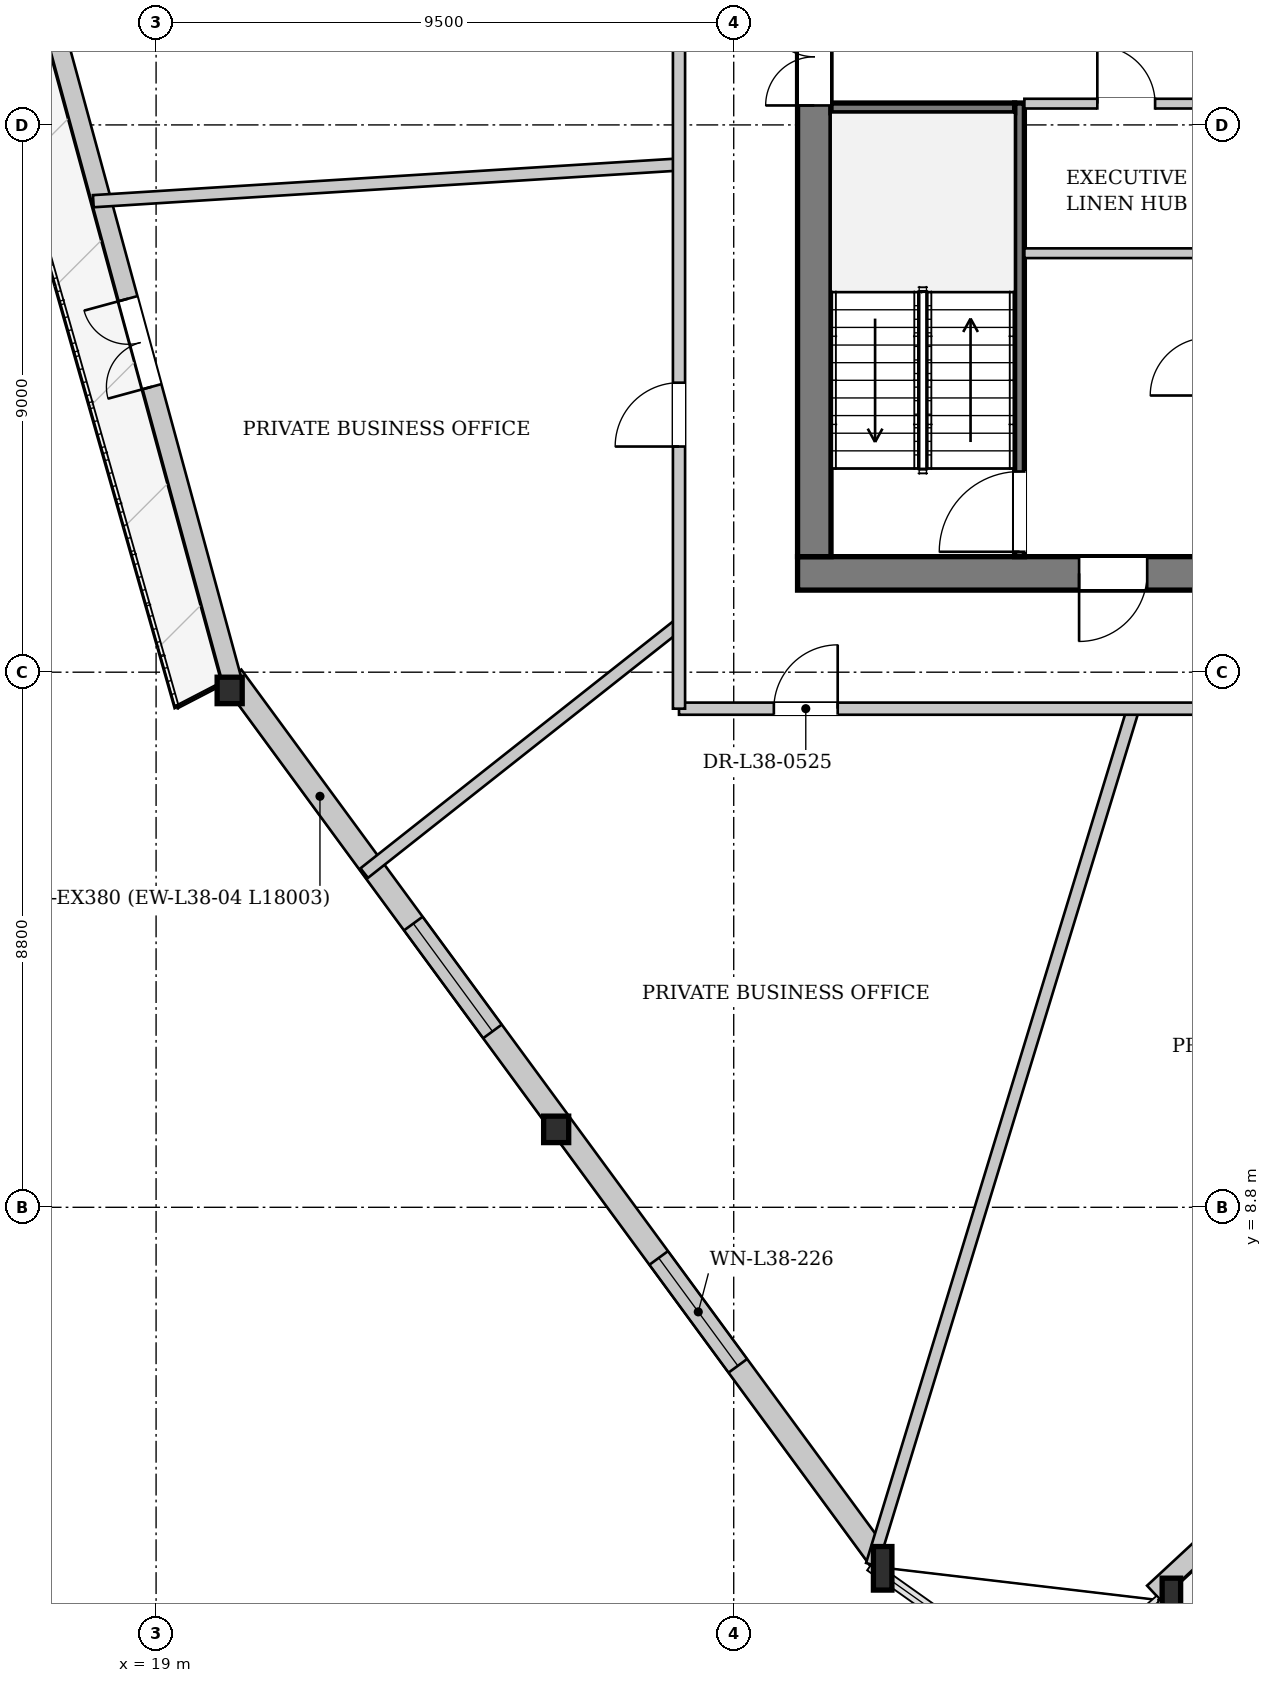
"""IFC4 building model, lengths in metres.
Left out: names, types, materials, properties, quantities, classifications, styles, units other than length and angle.
Written with IfcOpenShell. Run it as: python <this file> out.ifc"""

import sys

from ifc_helpers import new_model, si_unit, direction, frame, frame_2d, origin, origin_2d, place, context, subcontext, project, spatial, rectangle, i_section, extrude, source, transform, mapped, element, fill, save


model = new_model("IFC4")
c1 = context("Model", 3, precision=1e-05, world=origin(), true_north=direction((0.0, 1.0)))
c2 = subcontext(c1, "Body", "Model", "MODEL_VIEW")
j1 = project(units=[si_unit("LENGTHUNIT", "METRE"), si_unit("PLANEANGLEUNIT", "RADIAN")], contexts=[c1])
p1 = place(None, origin())
s1 = spatial("IfcSite", under=j1, at=p1, CompositionType="ELEMENT")
p2 = place(p1, origin())
s2 = spatial("IfcBuilding", under=s1, at=p2, CompositionType="ELEMENT")
p3 = place(p2, frame((0.0, 0.0, 146.6)))
s3 = spatial("IfcBuildingStorey", under=s2, at=p3, CompositionType="ELEMENT", Elevation=146.6)
m1 = source(origin(), c2, "Body", "SweptSolid", [
    extrude(i_section(OverallWidth=0.412, OverallDepth=0.435, WebThickness=0.031, FlangeThickness=0.05, at=origin_2d()), origin(), (0.0, 0.0, 1.0), 3.401),
])
p4 = place(p3, frame((20.095, 17.418, 0.0), z_axis=(0.067691864863, -0.069558236534, 0.995278585704), x_axis=(0.716655992996, 0.697426833225, 0.0)))
e1 = element("IfcColumn", 1, at=p4, inside=s3, PredefinedType="COLUMN", context=c2, shape_type="MappedRepresentation", body=[
    mapped(m1, transform((0.0, 0.0, 0.0), x_axis=(1.0, 0.0, 0.0), y_axis=(0.0, 1.0, 0.0), z_axis=(0.0, 0.0, 1.0), scale=1.0)),
])
m2 = source(origin(), c2, "Body", "SweptSolid", [
    extrude(i_section(OverallWidth=0.412, OverallDepth=0.435, WebThickness=0.031, FlangeThickness=0.05, at=origin_2d()), origin(), (0.0, 0.0, 1.0), 3.404),
])
p5 = place(p3, frame((25.42, 10.161, 0.0), z_axis=(0.093605825335, -0.046623591163, 0.994517063811), x_axis=(0.445841250264, 0.895112048608, 0.0)))
e2 = element("IfcColumn", 2, at=p5, inside=s3, PredefinedType="COLUMN", context=c2, shape_type="MappedRepresentation", body=[
    mapped(m2, transform((0.0, 0.0, 0.0), x_axis=(1.0, 0.0, 0.0), y_axis=(0.0, 1.0, 0.0), z_axis=(0.0, 0.0, 1.0), scale=1.0)),
])
m3 = source(origin(), c2, "Body", "SweptSolid", [
    extrude(i_section(OverallWidth=0.304, OverallDepth=0.716, WebThickness=0.021, FlangeThickness=0.04, at=origin_2d()), origin(), (0.0, 0.0, 1.0), 3.41),
])
p6 = place(p3, frame((30.746, 2.904, 0.0), z_axis=(0.119337187933, -0.023838802389, 0.992567552904), x_axis=(0.195889876884, 0.980625900196, 0.0)))
e3 = element("IfcColumn", 3, at=p6, inside=s3, PredefinedType="COLUMN", context=c2, shape_type="MappedRepresentation", body=[
    mapped(m3, transform((0.0, 0.0, 0.0), x_axis=(1.0, 0.0, 0.0), y_axis=(0.0, 1.0, 0.0), z_axis=(0.0, 0.0, 1.0), scale=1.0)),
])
m4 = source(origin(), c2, "Body", "SweptSolid", [
    extrude(i_section(OverallWidth=0.304, OverallDepth=0.716, WebThickness=0.021, FlangeThickness=0.04, at=origin_2d()), origin(), (0.0, 0.0, 1.0), 3.405),
])
p7 = place(p3, frame((35.516, 2.344, 0.0), z_axis=(0.107062289558, -0.000286838016, 0.994252273761), x_axis=(0.002679159842, 0.999996411045, 0.0)))
e4 = element("IfcColumn", 4, at=p7, inside=s3, PredefinedType="COLUMN", context=c2, shape_type="MappedRepresentation", body=[
    mapped(m4, transform((0.0, 0.0, 0.0), x_axis=(1.0, 0.0, 0.0), y_axis=(0.0, 1.0, 0.0), z_axis=(0.0, 0.0, 1.0), scale=1.0)),
])
p8 = place(p3, frame((52.73, 18.532, 0.0), z_axis=(0.0, 0.0, 1.0), x_axis=(-0.73309626957, -0.680124885255, 0.0)))
e5 = element("IfcWall", 5, at=p8, inside=s3, PredefinedType="SOLIDWALL", context=c2, shape_type="SweptSolid", body=[
    extrude(rectangle(XDim=23.63, YDim=0.32, at=frame_2d((11.815, 0.0))), origin(), (0.0, 0.0, 1.0), 2.692),
])
p9 = place(p8, frame((6.812, 0.0, 0.0)))
e6 = element("IfcOpeningElement", 6, at=p9, cuts=e5, PredefinedType="OPENING", context=c2, shape_type="SweptSolid", body=[
    extrude(rectangle(XDim=1.5, YDim=2.3, at=frame_2d((0.75, 1.15))), frame((0.0, 0.17, 0.0), z_axis=(0.0, -1.0, 0.0), x_axis=(1.0, 0.0, 0.0)), (0.0, 0.0, 1.0), 0.34),
])
p10 = place(p8, frame((16.186, 0.0, 0.25)))
e7 = element("IfcOpeningElement", 7, at=p10, cuts=e5, PredefinedType="OPENING", context=c2, shape_type="SweptSolid", body=[
    extrude(rectangle(XDim=2.6, YDim=2.35, at=frame_2d((1.3, 1.175))), frame((0.0, 0.17, 0.0), z_axis=(0.0, -1.0, 0.0), x_axis=(1.0, 0.0, 0.0)), (0.0, 0.0, 1.0), 0.34),
])
p11 = place(p3, frame((30.899, 3.016, 0.0), z_axis=(0.0, 0.0, 1.0), x_axis=(-0.591609379136, 0.806224746903, 0.0)))
e8 = element("IfcWall", 8, at=p11, inside=s3, PredefinedType="SOLIDWALL", context=c2, shape_type="SweptSolid", body=[
    extrude(rectangle(XDim=18.003, YDim=0.38, at=frame_2d((9.001, 0.0))), origin(), (0.0, 0.0, 1.0), 2.692),
])
p12 = place(p11, frame((3.941, 0.0, 0.322)))
e9 = element("IfcOpeningElement", 9, at=p12, cuts=e8, PredefinedType="OPENING", context=c2, shape_type="SweptSolid", body=[
    extrude(rectangle(XDim=2.2, YDim=2.25, at=frame_2d((1.1, 1.125))), frame((0.0, 0.2, 0.0), z_axis=(0.0, -1.0, 0.0), x_axis=(1.0, 0.0, 0.0)), (0.0, 0.0, 1.0), 0.4),
])
p13 = place(p11, frame((10.762, 0.0, 0.322)))
e10 = element("IfcOpeningElement", 10, at=p13, cuts=e8, PredefinedType="OPENING", context=c2, shape_type="SweptSolid", body=[
    extrude(rectangle(XDim=2.2, YDim=2.25, at=frame_2d((1.1, 1.125))), frame((0.0, 0.2, 0.0), z_axis=(0.0, -1.0, 0.0), x_axis=(1.0, 0.0, 0.0)), (0.0, 0.0, 1.0), 0.4),
])
p14 = place(p3, frame((20.25, 17.46, 0.0), z_axis=(0.0, 0.0, 1.0), x_axis=(-0.262728395916, 0.964869830588, 0.0)))
e11 = element("IfcWall", 11, at=p14, inside=s3, PredefinedType="SOLIDWALL", context=c2, shape_type="SweptSolid", body=[
    extrude(rectangle(XDim=18.003, YDim=0.32, at=frame_2d((9.002, 0.0))), origin(), (0.0, 0.0, 1.0), 2.692),
])
p15 = place(p14, frame((5.011, 0.0, 0.0)))
e12 = element("IfcOpeningElement", 12, at=p15, cuts=e11, PredefinedType="OPENING", context=c2, shape_type="SweptSolid", body=[
    extrude(rectangle(XDim=1.5, YDim=2.3, at=frame_2d((0.75, 1.15))), frame((0.0, 0.17, 0.0), z_axis=(0.0, -1.0, 0.0), x_axis=(1.0, 0.0, 0.0)), (0.0, 0.0, 1.0), 0.34),
])
p16 = place(p14, frame((12.022, 0.0, 0.25)))
e13 = element("IfcOpeningElement", 13, at=p16, cuts=e11, PredefinedType="OPENING", context=c2, shape_type="SweptSolid", body=[
    extrude(rectangle(XDim=2.6, YDim=2.35, at=frame_2d((1.3, 1.175))), frame((0.0, 0.17, 0.0), z_axis=(0.0, -1.0, 0.0), x_axis=(1.0, 0.0, 0.0)), (0.0, 0.0, 1.0), 0.34),
])
p17 = place(p3, frame((46.45, 19.225, 0.0), z_axis=(0.0, 0.0, 1.0), x_axis=(-1.0, 0.0, 0.0)))
e14 = element("IfcWall", 14, at=p17, inside=s3, PredefinedType="SHEAR", context=c2, shape_type="SweptSolid", body=[
    extrude(rectangle(XDim=16.9, YDim=0.55, at=frame_2d((8.45, 0.0))), origin(), (0.0, 0.0, 1.0), 3.3),
])
p18 = place(p17, frame((4.65, 0.0, 0.0)))
e15 = element("IfcOpeningElement", 15, at=p18, cuts=e14, PredefinedType="OPENING", context=c2, shape_type="SweptSolid", body=[
    extrude(rectangle(XDim=1.12, YDim=2.25, at=frame_2d((0.56, 1.125))), frame((0.0, 0.285, 0.0), z_axis=(0.0, -1.0, 0.0), x_axis=(1.0, 0.0, 0.0)), (0.0, 0.0, 1.0), 0.57),
])
p19 = place(p17, frame((11.15, 0.0, 0.0)))
e16 = element("IfcOpeningElement", 16, at=p19, cuts=e14, PredefinedType="OPENING", context=c2, shape_type="SweptSolid", body=[
    extrude(rectangle(XDim=1.12, YDim=2.25, at=frame_2d((0.56, 1.125))), frame((0.0, 0.285, 0.0), z_axis=(0.0, -1.0, 0.0), x_axis=(1.0, 0.0, 0.0)), (0.0, 0.0, 1.0), 0.57),
])
p20 = place(p3, frame((29.825, 19.5, 0.0), z_axis=(0.0, 0.0, 1.0), x_axis=(0.0, 1.0, 0.0)))
e17 = element("IfcWall", 17, at=p20, inside=s3, PredefinedType="SHEAR", context=c2, shape_type="SweptSolid", body=[
    extrude(rectangle(XDim=14.2, YDim=0.55, at=frame_2d((7.1, 0.0))), origin(), (0.0, 0.0, 1.0), 3.3),
])
p21 = place(p20, frame((7.42, 0.0, 0.0)))
e18 = element("IfcOpeningElement", 18, at=p21, cuts=e17, PredefinedType="OPENING", context=c2, shape_type="SweptSolid", body=[
    extrude(rectangle(XDim=1.6, YDim=2.2, at=frame_2d((0.8, 1.1))), frame((0.0, 0.285, 0.0), z_axis=(0.0, -1.0, 0.0), x_axis=(1.0, 0.0, 0.0)), (0.0, 0.0, 1.0), 0.57),
])
p22 = place(p3, frame((33.2, 19.5, 0.0), z_axis=(0.0, 0.0, 1.0), x_axis=(0.0, 1.0, 0.0)))
e19 = element("IfcWall", 19, at=p22, inside=s3, PredefinedType="PARTITIONING", context=c2, shape_type="SweptSolid", body=[
    extrude(rectangle(XDim=7.46, YDim=0.16, at=frame_2d((3.73, 0.0))), origin(), (0.0, 0.0, 1.0), 3.3),
])
p23 = place(p22, frame((0.08, 0.0, 0.0)))
e20 = element("IfcOpeningElement", 20, at=p23, cuts=e19, PredefinedType="OPENING", context=c2, shape_type="SweptSolid", body=[
    extrude(rectangle(XDim=1.32, YDim=2.2, at=frame_2d((0.66, 1.1))), frame((0.0, 0.09, 0.0), z_axis=(0.0, -1.0, 0.0), x_axis=(1.0, 0.0, 0.0)), (0.0, 0.0, 1.0), 0.18),
])
p24 = place(p3, frame((30.1, 26.88, 0.0), z_axis=(0.0, 0.0, 1.0), x_axis=(1.0, 0.0, 0.0)))
e21 = element("IfcWall", 21, at=p24, inside=s3, PredefinedType="PARTITIONING", context=c2, shape_type="SweptSolid", body=[
    extrude(rectangle(XDim=3.02, YDim=0.16, at=frame_2d((1.51, 0.0))), origin(), (0.0, 0.0, 1.0), 3.3),
])
p25 = place(p3, frame((33.28, 24.49, 0.0), z_axis=(0.0, 0.0, 1.0), x_axis=(1.0, 0.0, 0.0)))
e22 = element("IfcWall", 22, at=p25, inside=s3, PredefinedType="PARTITIONING", context=c2, shape_type="SweptSolid", body=[
    extrude(rectangle(XDim=9.44, YDim=0.16, at=frame_2d((4.72, 0.0))), origin(), (0.0, 0.0, 1.0), 3.3),
])
p26 = place(p3, frame((33.28, 26.95, 0.0), z_axis=(0.0, 0.0, 1.0), x_axis=(1.0, 0.0, 0.0)))
e23 = element("IfcWall", 23, at=p26, inside=s3, PredefinedType="PARTITIONING", context=c2, shape_type="SweptSolid", body=[
    extrude(rectangle(XDim=9.44, YDim=0.16, at=frame_2d((4.72, 0.0))), origin(), (0.0, 0.0, 1.0), 3.3),
])
p27 = place(p26, frame((1.2, 0.0, 0.0)))
e24 = element("IfcOpeningElement", 24, at=p27, cuts=e23, PredefinedType="OPENING", context=c2, shape_type="SweptSolid", body=[
    extrude(rectangle(XDim=0.95, YDim=2.1, at=frame_2d((0.475, 1.05))), frame((0.0, 0.09, 0.0), z_axis=(0.0, -1.0, 0.0), x_axis=(1.0, 0.0, 0.0)), (0.0, 0.0, 1.0), 0.18),
])
p28 = place(p26, frame((4.65, 0.0, 0.0)))
e25 = element("IfcOpeningElement", 25, at=p28, cuts=e23, PredefinedType="OPENING", context=c2, shape_type="SweptSolid", body=[
    extrude(rectangle(XDim=0.95, YDim=2.1, at=frame_2d((0.475, 1.05))), frame((0.0, 0.09, 0.0), z_axis=(0.0, -1.0, 0.0), x_axis=(1.0, 0.0, 0.0)), (0.0, 0.0, 1.0), 0.18),
])
p29 = place(p26, frame((7.67, 0.0, 0.0)))
e26 = element("IfcOpeningElement", 26, at=p29, cuts=e23, PredefinedType="OPENING", context=c2, shape_type="SweptSolid", body=[
    extrude(rectangle(XDim=1.1, YDim=2.2, at=frame_2d((0.55, 1.1))), frame((0.0, 0.09, 0.0), z_axis=(0.0, -1.0, 0.0), x_axis=(1.0, 0.0, 0.0)), (0.0, 0.0, 1.0), 0.18),
])
p30 = place(p3, frame((27.6, 25.949, 0.0), z_axis=(0.0, 0.0, 1.0), x_axis=(-0.998046076706, -0.062482227644, 0.0)))
e27 = element("IfcWall", 27, at=p30, inside=s3, PredefinedType="PARTITIONING", context=c2, shape_type="SweptSolid", body=[
    extrude(rectangle(XDim=9.651, YDim=0.2, at=frame_2d((4.826, 0.0))), origin(), (0.0, 0.0, 1.0), 3.3),
])
p31 = place(p3, frame((27.6, 18.385, 0.0), z_axis=(0.0, 0.0, 1.0), x_axis=(-0.784734967532, -0.619831453487, 0.0)))
e28 = element("IfcWall", 28, at=p31, inside=s3, PredefinedType="PARTITIONING", context=c2, shape_type="SweptSolid", body=[
    extrude(rectangle(XDim=6.597, YDim=0.2, at=frame_2d((3.299, 0.0))), origin(), (0.0, 0.0, 1.0), 3.3),
])
p32 = place(p3, frame((35.07, 17.0, 0.0), z_axis=(0.0, 0.0, 1.0), x_axis=(-0.29195683842, -0.956431494933, 0.0)))
e29 = element("IfcWall", 29, at=p32, inside=s3, PredefinedType="PARTITIONING", context=c2, shape_type="SweptSolid", body=[
    extrude(rectangle(XDim=14.719, YDim=0.2, at=frame_2d((7.36, 0.0))), origin(), (0.0, 0.0, 1.0), 2.895),
])
p33 = place(p3, frame((27.6, 17.0, 0.0), z_axis=(0.0, 0.0, 1.0), x_axis=(1.0, 0.0, 0.0)))
e30 = element("IfcWall", 30, at=p33, inside=s3, PredefinedType="PARTITIONING", context=c2, shape_type="SweptSolid", body=[
    extrude(rectangle(XDim=20.8, YDim=0.2, at=frame_2d((10.4, 0.0))), origin(), (0.0, 0.0, 1.0), 3.3),
])
p34 = place(p33, frame((1.56, 0.0, 0.0)))
e31 = element("IfcOpeningElement", 31, at=p34, cuts=e30, PredefinedType="OPENING", context=c2, shape_type="SweptSolid", body=[
    extrude(rectangle(XDim=1.05, YDim=2.2, at=frame_2d((0.525, 1.1))), frame((0.0, 0.11, 0.0), z_axis=(0.0, -1.0, 0.0), x_axis=(1.0, 0.0, 0.0)), (0.0, 0.0, 1.0), 0.22),
])
p35 = place(p33, frame((8.616, 0.0, 0.0)))
e32 = element("IfcOpeningElement", 32, at=p35, cuts=e30, PredefinedType="OPENING", context=c2, shape_type="SweptSolid", body=[
    extrude(rectangle(XDim=1.05, YDim=2.2, at=frame_2d((0.525, 1.1))), frame((0.0, 0.11, 0.0), z_axis=(0.0, -1.0, 0.0), x_axis=(1.0, 0.0, 0.0)), (0.0, 0.0, 1.0), 0.22),
])
p36 = place(p33, frame((18.781, 0.0, 0.0)))
e33 = element("IfcOpeningElement", 33, at=p36, cuts=e30, PredefinedType="OPENING", context=c2, shape_type="SweptSolid", body=[
    extrude(rectangle(XDim=1.05, YDim=2.2, at=frame_2d((0.525, 1.1))), frame((0.0, 0.11, 0.0), z_axis=(0.0, -1.0, 0.0), x_axis=(1.0, 0.0, 0.0)), (0.0, 0.0, 1.0), 0.22),
])
p37 = place(p3, frame((27.6, 17.0, 0.0), z_axis=(0.0, 0.0, 1.0), x_axis=(0.0, 1.0, 0.0)))
e34 = element("IfcWall", 34, at=p37, inside=s3, PredefinedType="PARTITIONING", context=c2, shape_type="SweptSolid", body=[
    extrude(rectangle(XDim=19.2, YDim=0.2, at=frame_2d((9.6, 0.0))), origin(), (0.0, 0.0, 1.0), 3.3),
])
p38 = place(p37, frame((17.85, 0.0, 0.0)))
e35 = element("IfcOpeningElement", 35, at=p38, cuts=e34, PredefinedType="OPENING", context=c2, shape_type="SweptSolid", body=[
    extrude(rectangle(XDim=1.05, YDim=2.2, at=frame_2d((0.525, 1.1))), frame((0.0, 0.11, 0.0), z_axis=(0.0, -1.0, 0.0), x_axis=(1.0, 0.0, 0.0)), (0.0, 0.0, 1.0), 0.22),
])
p39 = place(p37, frame((11.918, 0.0, 0.0)))
e36 = element("IfcOpeningElement", 36, at=p39, cuts=e34, PredefinedType="OPENING", context=c2, shape_type="SweptSolid", body=[
    extrude(rectangle(XDim=1.05, YDim=2.2, at=frame_2d((0.525, 1.1))), frame((0.0, 0.11, 0.0), z_axis=(0.0, -1.0, 0.0), x_axis=(1.0, 0.0, 0.0)), (0.0, 0.0, 1.0), 0.22),
])
p40 = place(p37, frame((4.311, 0.0, 0.0)))
e37 = element("IfcOpeningElement", 37, at=p40, cuts=e34, PredefinedType="OPENING", context=c2, shape_type="SweptSolid", body=[
    extrude(rectangle(XDim=1.05, YDim=2.2, at=frame_2d((0.525, 1.1))), frame((0.0, 0.11, 0.0), z_axis=(0.0, -1.0, 0.0), x_axis=(1.0, 0.0, 0.0)), (0.0, 0.0, 1.0), 0.22),
])
m5 = source(origin(), c2, "Body", "SweptSolid", [
    extrude(rectangle(XDim=2.2, YDim=2.25, at=frame_2d((1.1, 1.125))), frame((0.0, 0.03, 0.0), z_axis=(0.0, -1.0, 0.0), x_axis=(1.0, 0.0, 0.0)), (0.0, 0.0, 1.0), 0.06),
])
p41 = place(p12, origin())
e38 = element("IfcWindow", 38, at=p41, inside=s3, PartitioningType="SINGLE_PANEL", PredefinedType="WINDOW", context=c2, shape_type="MappedRepresentation", body=[
    mapped(m5, transform((0.0, 0.0, 0.0), x_axis=(1.0, 0.0, 0.0), y_axis=(0.0, 1.0, 0.0), z_axis=(0.0, 0.0, 1.0), scale=1.0)),
])
fill(e9, e38)
p42 = place(p13, origin())
e39 = element("IfcWindow", 39, at=p42, inside=s3, PartitioningType="SINGLE_PANEL", PredefinedType="WINDOW", context=c2, shape_type="MappedRepresentation", body=[
    mapped(m5, transform((0.0, 0.0, 0.0), x_axis=(1.0, 0.0, 0.0), y_axis=(0.0, 1.0, 0.0), z_axis=(0.0, 0.0, 1.0), scale=1.0)),
])
fill(e10, e39)
m6 = source(origin(), c2, "Body", "SweptSolid", [
    extrude(rectangle(XDim=1.5, YDim=2.3, at=frame_2d((0.75, 1.15))), frame((0.0, 0.025, 0.0), z_axis=(0.0, -1.0, 0.0), x_axis=(1.0, 0.0, 0.0)), (0.0, 0.0, 1.0), 0.05),
])
p43 = place(p15, origin())
e40 = element("IfcDoor", 40, at=p43, inside=s3, OperationType="DOUBLE_DOOR_SINGLE_SWING", PredefinedType="DOOR", context=c2, shape_type="MappedRepresentation", body=[
    mapped(m6, transform((0.0, 0.0, 0.0), x_axis=(1.0, 0.0, 0.0), y_axis=(0.0, 1.0, 0.0), z_axis=(0.0, 0.0, 1.0), scale=1.0)),
])
fill(e12, e40)
m7 = source(origin(), c2, "Body", "SweptSolid", [
    extrude(rectangle(XDim=1.12, YDim=2.25, at=frame_2d((0.56, 1.125))), frame((0.0, 0.025, 0.0), z_axis=(0.0, -1.0, 0.0), x_axis=(1.0, 0.0, 0.0)), (0.0, 0.0, 1.0), 0.05),
])
p44 = place(p19, origin())
e41 = element("IfcDoor", 41, at=p44, inside=s3, OperationType="SINGLE_SWING_RIGHT", PredefinedType="DOOR", context=c2, shape_type="MappedRepresentation", body=[
    mapped(m7, transform((0.0, 0.0, 0.0), x_axis=(1.0, 0.0, 0.0), y_axis=(0.0, 1.0, 0.0), z_axis=(0.0, 0.0, 1.0), scale=1.0)),
])
fill(e16, e41)
m8 = source(origin(), c2, "Body", "SweptSolid", [
    extrude(rectangle(XDim=1.6, YDim=2.2, at=frame_2d((0.8, 1.1))), frame((0.0, 0.025, 0.0), z_axis=(0.0, -1.0, 0.0), x_axis=(1.0, 0.0, 0.0)), (0.0, 0.0, 1.0), 0.05),
])
p45 = place(p21, origin())
e42 = element("IfcDoor", 42, at=p45, inside=s3, OperationType="DOUBLE_DOOR_SINGLE_SWING", PredefinedType="DOOR", context=c2, shape_type="MappedRepresentation", body=[
    mapped(m8, transform((0.0, 0.0, 0.0), x_axis=(1.0, 0.0, 0.0), y_axis=(0.0, 1.0, 0.0), z_axis=(0.0, 0.0, 1.0), scale=1.0)),
])
fill(e18, e42)
m9 = source(origin(), c2, "Body", "SweptSolid", [
    extrude(rectangle(XDim=1.32, YDim=2.2, at=frame_2d((0.66, 1.1))), frame((0.0, 0.025, 0.0), z_axis=(0.0, -1.0, 0.0), x_axis=(1.0, 0.0, 0.0)), (0.0, 0.0, 1.0), 0.05),
])
p46 = place(p23, origin())
e43 = element("IfcDoor", 43, at=p46, inside=s3, OperationType="SINGLE_SWING_LEFT", PredefinedType="DOOR", context=c2, shape_type="MappedRepresentation", body=[
    mapped(m9, transform((0.0, 0.0, 0.0), x_axis=(1.0, 0.0, 0.0), y_axis=(0.0, 1.0, 0.0), z_axis=(0.0, 0.0, 1.0), scale=1.0)),
])
fill(e20, e43)
m10 = source(origin(), c2, "Body", "SweptSolid", [
    extrude(rectangle(XDim=0.95, YDim=2.1, at=frame_2d((0.475, 1.05))), frame((0.0, 0.025, 0.0), z_axis=(0.0, -1.0, 0.0), x_axis=(1.0, 0.0, 0.0)), (0.0, 0.0, 1.0), 0.05),
])
p47 = place(p27, origin())
e44 = element("IfcDoor", 44, at=p47, inside=s3, OperationType="SINGLE_SWING_LEFT", PredefinedType="DOOR", context=c2, shape_type="MappedRepresentation", body=[
    mapped(m10, transform((0.0, 0.0, 0.0), x_axis=(1.0, 0.0, 0.0), y_axis=(0.0, 1.0, 0.0), z_axis=(0.0, 0.0, 1.0), scale=1.0)),
])
fill(e24, e44)
m11 = source(origin(), c2, "Body", "SweptSolid", [
    extrude(rectangle(XDim=1.05, YDim=2.2, at=frame_2d((0.525, 1.1))), frame((0.0, 0.025, 0.0), z_axis=(0.0, -1.0, 0.0), x_axis=(1.0, 0.0, 0.0)), (0.0, 0.0, 1.0), 0.05),
])
p48 = place(p34, origin())
e45 = element("IfcDoor", 45, at=p48, inside=s3, OperationType="SINGLE_SWING_RIGHT", PredefinedType="DOOR", context=c2, shape_type="MappedRepresentation", body=[
    mapped(m11, transform((0.0, 0.0, 0.0), x_axis=(1.0, 0.0, 0.0), y_axis=(0.0, 1.0, 0.0), z_axis=(0.0, 0.0, 1.0), scale=1.0)),
])
fill(e31, e45)
p49 = place(p40, origin())
e46 = element("IfcDoor", 46, at=p49, inside=s3, OperationType="SINGLE_SWING_LEFT", PredefinedType="DOOR", context=c2, shape_type="MappedRepresentation", body=[
    mapped(m11, transform((0.0, 0.0, 0.0), x_axis=(1.0, 0.0, 0.0), y_axis=(0.0, 1.0, 0.0), z_axis=(0.0, 0.0, 1.0), scale=1.0)),
])
fill(e37, e46)
save(model, sys.argv[1])
